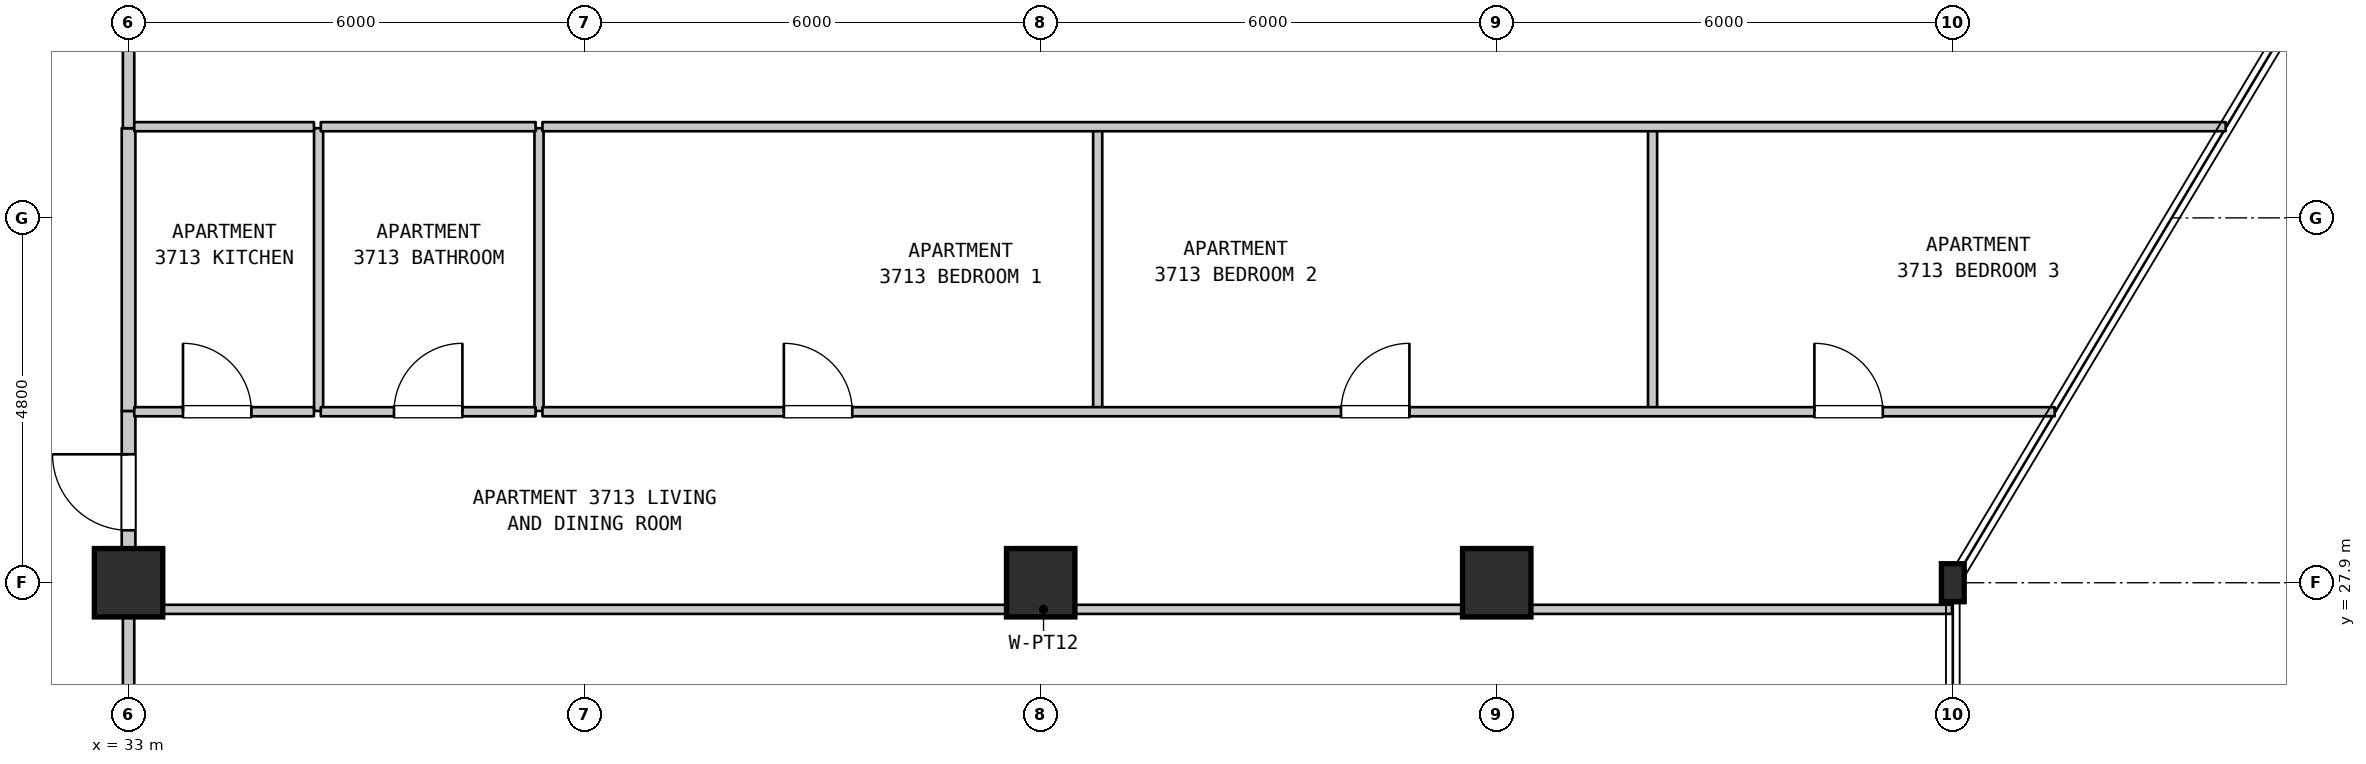
"""IFC4 building model, lengths in metres.
Left out: names, types, materials, properties, quantities, classifications, styles, units other than length and angle.
Written with IfcOpenShell. Run it as: python <this file> out.ifc"""

import sys

from ifc_helpers import new_model, si_unit, direction, frame, frame_2d, origin, origin_2d, place, context, subcontext, project, spatial, rectangle, i_section, extrude, element, fill, save


model = new_model("IFC4")
c1 = context("Model", 3, precision=1e-05, world=origin(), true_north=direction((0.0, 1.0)))
c2 = subcontext(c1, "Body", "Model", "MODEL_VIEW")
j1 = project(units=[si_unit("LENGTHUNIT", "METRE"), si_unit("PLANEANGLEUNIT", "RADIAN")], contexts=[c1])
p1 = place(None, origin())
s1 = spatial("IfcSite", under=j1, at=p1, CompositionType="ELEMENT")
p2 = place(p1, origin())
s2 = spatial("IfcBuilding", under=s1, at=p2, CompositionType="ELEMENT")
p3 = place(p2, frame((0.0, 0.0, 152.0)))
s3 = spatial("IfcBuildingStorey", under=s2, at=p3, CompositionType="ELEMENT", Elevation=152.0)
for number, where, z_axis, x_axis in (
    (1, (33.0, 27.9, 0.0), (0.0, 0.0, 1.0), (1.0, 0.0, 0.0)),
    (2, (45.0, 27.9, 0.0), (0.0, 0.0, 1.0), (1.0, 0.0, 0.0)),
    (3, (51.0, 27.9, 0.0), (0.0, 0.0, 1.0), (1.0, 0.0, 0.0)),
):
    element("IfcColumn", number, at=place(p3, frame(where, z_axis=z_axis, x_axis=x_axis)), inside=s3, PredefinedType="COLUMN", context=c2, shape_type="SweptSolid", body=[
        extrude(rectangle(XDim=0.9, YDim=0.9, at=origin_2d()), origin(), (0.0, 0.0, 1.0), 3.7),
    ])
p4 = place(p3, frame((57.0, 27.9, 0.0), z_axis=(0.0, 0.0, 1.0), x_axis=(1.0, 0.0, 0.0)))
e4 = element("IfcColumn", 4, at=p4, inside=s3, PredefinedType="COLUMN", context=c2, shape_type="SweptSolid", body=[
    extrude(i_section(OverallWidth=0.3, OverallDepth=0.5, WebThickness=0.014, FlangeThickness=0.028, FilletRadius=0.027, at=origin_2d()), origin(), (0.0, 0.0, 1.0), 3.7),
])
p5 = place(p3, frame((33.0, 19.51, 0.0), z_axis=(0.0, 0.0, 1.0), x_axis=(0.0, 1.0, 0.0)))
e5 = element("IfcWall", 5, at=p5, inside=s3, PredefinedType="STANDARD", context=c2, shape_type="SweptSolid", body=[
    extrude(rectangle(XDim=8.04, YDim=0.15, at=frame_2d((4.02, 0.0))), origin(), (0.0, 0.0, 1.0), 2.935),
])
p6 = place(p5, frame((0.12, 0.0, 0.0)))
e6 = element("IfcOpeningElement", 6, at=p6, cuts=e5, PredefinedType="OPENING", context=c2, shape_type="SweptSolid", body=[
    extrude(rectangle(XDim=1.0, YDim=2.15, at=frame_2d((0.5, 1.075))), frame((0.0, 0.085, 0.0), z_axis=(0.0, -1.0, 0.0), x_axis=(1.0, 0.0, 0.0)), (0.0, 0.0, 1.0), 0.17),
])
p7 = place(p3, frame((33.0, 27.56, 0.0), z_axis=(0.0, 0.0, 1.0), x_axis=(0.0, 1.0, 0.0)))
e7 = element("IfcWall", 7, at=p7, inside=s3, PredefinedType="STANDARD", context=c2, shape_type="SweptSolid", body=[
    extrude(rectangle(XDim=2.6, YDim=0.18, at=frame_2d((1.3, 0.0))), origin(), (0.0, 0.0, 1.0), 2.885),
])
p8 = place(p7, frame((1.03, 0.0, 0.0)))
e8 = element("IfcOpeningElement", 8, at=p8, cuts=e7, PredefinedType="OPENING", context=c2, shape_type="SweptSolid", body=[
    extrude(rectangle(XDim=1.0, YDim=2.15, at=frame_2d((0.5, 1.075))), frame((0.0, 0.1, 0.0), z_axis=(0.0, -1.0, 0.0), x_axis=(1.0, 0.0, 0.0)), (0.0, 0.0, 1.0), 0.2),
])
p9 = place(p3, frame((33.0, 30.16, 0.0), z_axis=(0.0, 0.0, 1.0), x_axis=(0.0, 1.0, 0.0)))
e9 = element("IfcWall", 9, at=p9, inside=s3, PredefinedType="STANDARD", context=c2, shape_type="SweptSolid", body=[
    extrude(rectangle(XDim=3.72, YDim=0.18, at=frame_2d((1.86, 0.0))), origin(), (0.0, 0.0, 1.0), 2.885),
])
p10 = place(p3, frame((33.0, 33.88, 0.0), z_axis=(0.0, 0.0, 1.0), x_axis=(0.0, 1.0, 0.0)))
e10 = element("IfcWall", 10, at=p10, inside=s3, PredefinedType="STANDARD", context=c2, shape_type="SweptSolid", body=[
    extrude(rectangle(XDim=4.02, YDim=0.15, at=frame_2d((2.01, 0.0))), origin(), (0.0, 0.0, 1.0), 2.885),
])
p11 = place(p10, frame((1.436, 0.0, 0.0)))
e11 = element("IfcOpeningElement", 11, at=p11, cuts=e10, PredefinedType="OPENING", context=c2, shape_type="SweptSolid", body=[
    extrude(rectangle(XDim=1.0, YDim=2.15, at=frame_2d((0.5, 1.075))), frame((0.0, 0.085, 0.0), z_axis=(0.0, -1.0, 0.0), x_axis=(1.0, 0.0, 0.0)), (0.0, 0.0, 1.0), 0.17),
])
for number, where, z_axis, x_axis in (
    (12, (35.5, 30.16, 0.0), (0.0, 0.0, 1.0), (0.0, 1.0, 0.0)),
    (13, (38.4, 30.16, 0.0), (0.0, 0.0, 1.0), (0.0, 1.0, 0.0)),
    (14, (45.75, 30.16, 0.0), (0.0, 0.0, 1.0), (0.0, 1.0, 0.0)),
    (15, (53.05, 30.16, 0.0), (0.0, 0.0, 1.0), (0.0, 1.0, 0.0)),
):
    element("IfcWall", number, at=place(p3, frame(where, z_axis=z_axis, x_axis=x_axis)), inside=s3, PredefinedType="PARTITIONING", context=c2, shape_type="SweptSolid", body=[
        extrude(rectangle(XDim=3.72, YDim=0.12, at=frame_2d((1.86, 0.0))), origin(), (0.0, 0.0, 1.0), 3.385),
    ])
p12 = place(p3, frame((33.085, 27.55, 0.0), z_axis=(0.0, 0.0, 1.0), x_axis=(1.0, 0.0, 0.0)))
e16 = element("IfcWall", 16, at=p12, inside=s3, PredefinedType="PARTITIONING", context=c2, shape_type="SweptSolid", body=[
    extrude(rectangle(XDim=23.905, YDim=0.12, at=frame_2d((11.953, 0.0))), origin(), (0.0, 0.0, 1.0), 3.385),
])
p13 = place(p3, frame((33.075, 30.15, 0.0), z_axis=(0.0, 0.0, 1.0), x_axis=(1.0, 0.0, 0.0)))
e17 = element("IfcWall", 17, at=p13, inside=s3, PredefinedType="PARTITIONING", context=c2, shape_type="SweptSolid", body=[
    extrude(rectangle(XDim=2.364, YDim=0.12, at=frame_2d((1.182, 0.0))), origin(), (0.0, 0.0, 1.0), 3.385),
])
p14 = place(p13, frame((0.641, 0.0, 0.0)))
e18 = element("IfcOpeningElement", 18, at=p14, cuts=e17, PredefinedType="OPENING", context=c2, shape_type="SweptSolid", body=[
    extrude(rectangle(XDim=0.9, YDim=2.15, at=frame_2d((0.45, 1.075))), frame((0.0, 0.07, 0.0), z_axis=(0.0, -1.0, 0.0), x_axis=(1.0, 0.0, 0.0)), (0.0, 0.0, 1.0), 0.14),
])
p15 = place(p3, frame((35.529, 30.15, 0.0), z_axis=(0.0, 0.0, 1.0), x_axis=(1.0, 0.0, 0.0)))
e19 = element("IfcWall", 19, at=p15, inside=s3, PredefinedType="PARTITIONING", context=c2, shape_type="SweptSolid", body=[
    extrude(rectangle(XDim=2.826, YDim=0.12, at=frame_2d((1.413, 0.0))), origin(), (0.0, 0.0, 1.0), 3.385),
])
p16 = place(p15, frame((0.963, 0.0, 0.0)))
e20 = element("IfcOpeningElement", 20, at=p16, cuts=e19, PredefinedType="OPENING", context=c2, shape_type="SweptSolid", body=[
    extrude(rectangle(XDim=0.9, YDim=2.1, at=frame_2d((0.45, 1.05))), frame((0.0, 0.07, 0.0), z_axis=(0.0, -1.0, 0.0), x_axis=(1.0, 0.0, 0.0)), (0.0, 0.0, 1.0), 0.14),
])
p17 = place(p3, frame((38.445, 30.15, 0.0), z_axis=(0.0, 0.0, 1.0), x_axis=(1.0, 0.0, 0.0)))
e21 = element("IfcWall", 21, at=p17, inside=s3, PredefinedType="PARTITIONING", context=c2, shape_type="SweptSolid", body=[
    extrude(rectangle(XDim=19.895, YDim=0.12, at=frame_2d((9.948, 0.0))), origin(), (0.0, 0.0, 1.0), 3.385),
])
p18 = place(p17, frame((3.176, 0.0, 0.0)))
e22 = element("IfcOpeningElement", 22, at=p18, cuts=e21, PredefinedType="OPENING", context=c2, shape_type="SweptSolid", body=[
    extrude(rectangle(XDim=0.9, YDim=2.15, at=frame_2d((0.45, 1.075))), frame((0.0, 0.07, 0.0), z_axis=(0.0, -1.0, 0.0), x_axis=(1.0, 0.0, 0.0)), (0.0, 0.0, 1.0), 0.14),
])
p19 = place(p17, frame((10.506, 0.0, 0.0)))
e23 = element("IfcOpeningElement", 23, at=p19, cuts=e21, PredefinedType="OPENING", context=c2, shape_type="SweptSolid", body=[
    extrude(rectangle(XDim=0.9, YDim=2.15, at=frame_2d((0.45, 1.075))), frame((0.0, 0.07, 0.0), z_axis=(0.0, -1.0, 0.0), x_axis=(1.0, 0.0, 0.0)), (0.0, 0.0, 1.0), 0.14),
])
p20 = place(p17, frame((16.734, 0.0, 0.0)))
e24 = element("IfcOpeningElement", 24, at=p20, cuts=e21, PredefinedType="OPENING", context=c2, shape_type="SweptSolid", body=[
    extrude(rectangle(XDim=0.9, YDim=2.15, at=frame_2d((0.45, 1.075))), frame((0.0, 0.07, 0.0), z_axis=(0.0, -1.0, 0.0), x_axis=(1.0, 0.0, 0.0)), (0.0, 0.0, 1.0), 0.14),
])
p21 = place(p3, frame((33.075, 33.9, 0.0), z_axis=(0.0, 0.0, 1.0), x_axis=(1.0, 0.0, 0.0)))
e25 = element("IfcWall", 25, at=p21, inside=s3, PredefinedType="PARTITIONING", context=c2, shape_type="SweptSolid", body=[
    extrude(rectangle(XDim=2.364, YDim=0.12, at=frame_2d((1.182, 0.0))), origin(), (0.0, 0.0, 1.0), 3.385),
])
p22 = place(p3, frame((35.529, 33.9, 0.0), z_axis=(0.0, 0.0, 1.0), x_axis=(1.0, 0.0, 0.0)))
e26 = element("IfcWall", 26, at=p22, inside=s3, PredefinedType="PARTITIONING", context=c2, shape_type="SweptSolid", body=[
    extrude(rectangle(XDim=2.826, YDim=0.12, at=frame_2d((1.413, 0.0))), origin(), (0.0, 0.0, 1.0), 3.385),
])
p23 = place(p3, frame((38.445, 33.9, 0.0), z_axis=(0.0, 0.0, 1.0), x_axis=(1.0, 0.0, 0.0)))
e27 = element("IfcWall", 27, at=p23, inside=s3, PredefinedType="PARTITIONING", context=c2, shape_type="SweptSolid", body=[
    extrude(rectangle(XDim=22.145, YDim=0.12, at=frame_2d((11.073, 0.0))), origin(), (0.0, 0.0, 1.0), 3.385),
])
p24 = place(p8, origin())
e28 = element("IfcDoor", 28, at=p24, inside=s3, OperationType="SINGLE_SWING_RIGHT", PredefinedType="DOOR", context=c2, shape_type="SweptSolid", body=[
    extrude(rectangle(XDim=1.0, YDim=2.15, at=frame_2d((0.5, 1.075))), frame((0.0, 0.025, 0.0), z_axis=(0.0, -1.0, 0.0), x_axis=(1.0, 0.0, 0.0)), (0.0, 0.0, 1.0), 0.05),
])
fill(e8, e28)
p25 = place(p14, origin())
e29 = element("IfcDoor", 29, at=p25, inside=s3, OperationType="SINGLE_SWING_LEFT", PredefinedType="DOOR", context=c2, shape_type="SweptSolid", body=[
    extrude(rectangle(XDim=0.9, YDim=2.15, at=frame_2d((0.45, 1.075))), frame((0.0, 0.025, 0.0), z_axis=(0.0, -1.0, 0.0), x_axis=(1.0, 0.0, 0.0)), (0.0, 0.0, 1.0), 0.05),
])
fill(e18, e29)
p26 = place(p16, origin())
e30 = element("IfcDoor", 30, at=p26, inside=s3, OperationType="SINGLE_SWING_RIGHT", PredefinedType="DOOR", context=c2, shape_type="SweptSolid", body=[
    extrude(rectangle(XDim=0.9, YDim=2.1, at=frame_2d((0.45, 1.05))), frame((0.0, 0.025, 0.0), z_axis=(0.0, -1.0, 0.0), x_axis=(1.0, 0.0, 0.0)), (0.0, 0.0, 1.0), 0.05),
])
fill(e20, e30)
p27 = place(p18, origin())
e31 = element("IfcDoor", 31, at=p27, inside=s3, OperationType="SINGLE_SWING_LEFT", PredefinedType="DOOR", context=c2, shape_type="SweptSolid", body=[
    extrude(rectangle(XDim=0.9, YDim=2.15, at=frame_2d((0.45, 1.075))), frame((0.0, 0.025, 0.0), z_axis=(0.0, -1.0, 0.0), x_axis=(1.0, 0.0, 0.0)), (0.0, 0.0, 1.0), 0.05),
])
fill(e22, e31)
p28 = place(p19, origin())
e32 = element("IfcDoor", 32, at=p28, inside=s3, OperationType="SINGLE_SWING_RIGHT", PredefinedType="DOOR", context=c2, shape_type="SweptSolid", body=[
    extrude(rectangle(XDim=0.9, YDim=2.15, at=frame_2d((0.45, 1.075))), frame((0.0, 0.025, 0.0), z_axis=(0.0, -1.0, 0.0), x_axis=(1.0, 0.0, 0.0)), (0.0, 0.0, 1.0), 0.05),
])
fill(e23, e32)
p29 = place(p20, origin())
e33 = element("IfcDoor", 33, at=p29, inside=s3, OperationType="SINGLE_SWING_LEFT", PredefinedType="DOOR", context=c2, shape_type="SweptSolid", body=[
    extrude(rectangle(XDim=0.9, YDim=2.15, at=frame_2d((0.45, 1.075))), frame((0.0, 0.025, 0.0), z_axis=(0.0, -1.0, 0.0), x_axis=(1.0, 0.0, 0.0)), (0.0, 0.0, 1.0), 0.05),
])
fill(e24, e33)
save(model, sys.argv[1])
